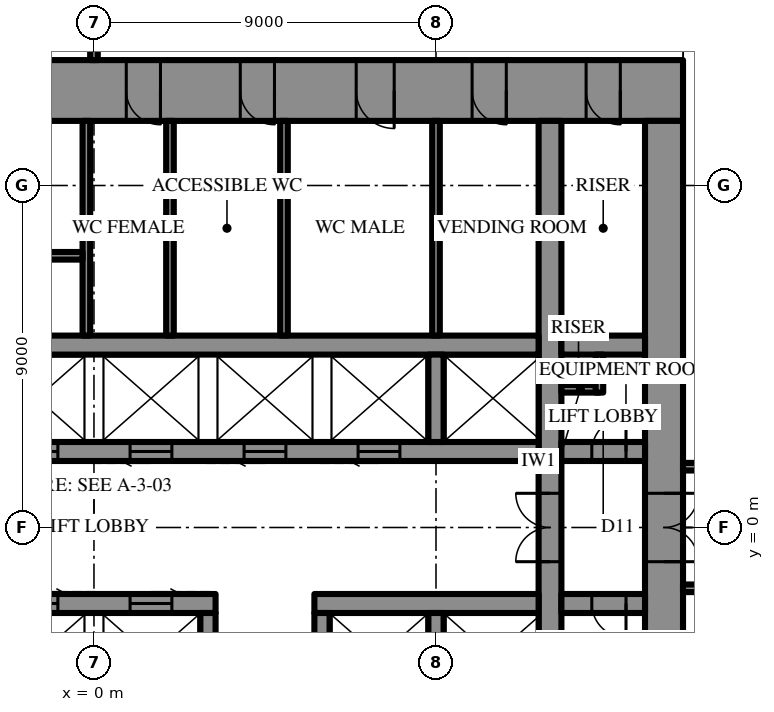
"""IFC4 building model, lengths in metres.
Left out: names, types, materials, properties, quantities, classifications, styles, units other than length and angle.
Written with IfcOpenShell. Run it as: python <this file> out.ifc"""

import sys

from ifc_helpers import new_model, si_unit, direction, frame, frame_2d, origin, place, context, subcontext, project, spatial, rectangle, extrude, element, fill, save


model = new_model("IFC4")
c1 = context("Model", 3, precision=1e-05, world=origin(), true_north=direction((0.0, 1.0)))
c2 = subcontext(c1, "Body", "Model", "MODEL_VIEW")
j1 = project(units=[si_unit("LENGTHUNIT", "METRE"), si_unit("PLANEANGLEUNIT", "RADIAN")], contexts=[c1])
p1 = place(None, origin())
s1 = spatial("IfcSite", under=j1, at=p1, CompositionType="ELEMENT")
p2 = place(p1, origin())
s2 = spatial("IfcBuilding", under=s1, at=p2, CompositionType="ELEMENT")
p3 = place(p2, frame((0.0, 0.0, 265.9)))
s3 = spatial("IfcBuildingStorey", under=s2, at=p3, CompositionType="ELEMENT", Elevation=265.9)
p4 = place(p3, frame((-15.5, 11.5, 0.0), z_axis=(0.0, 0.0, 1.0), x_axis=(1.0, 0.0, 0.0)))
e1 = element("IfcWall", 1, at=p4, inside=s3, PredefinedType="SHEAR", context=c2, shape_type="SweptSolid", body=[
    extrude(rectangle(XDim=31.0, YDim=1.6, at=frame_2d((15.5, 0.0))), origin(), (0.0, 0.0, 1.0), 4.2),
])
p5 = place(p4, frame((16.35, 0.0, 0.0)))
e2 = element("IfcOpeningElement", 2, at=p5, cuts=e1, PredefinedType="OPENING", context=c2, shape_type="SweptSolid", body=[
    extrude(rectangle(XDim=0.9, YDim=2.2, at=frame_2d((0.45, 1.1))), frame((0.0, 0.81, 0.0), z_axis=(0.0, -1.0, 0.0), x_axis=(1.0, 0.0, 0.0)), (0.0, 0.0, 1.0), 1.62),
])
p6 = place(p4, frame((19.35, 0.0, 0.0)))
e3 = element("IfcOpeningElement", 3, at=p6, cuts=e1, PredefinedType="OPENING", context=c2, shape_type="SweptSolid", body=[
    extrude(rectangle(XDim=0.9, YDim=2.2, at=frame_2d((0.45, 1.1))), frame((0.0, 0.81, 0.0), z_axis=(0.0, -1.0, 0.0), x_axis=(1.0, 0.0, 0.0)), (0.0, 0.0, 1.0), 1.62),
])
p7 = place(p4, frame((22.4, 0.0, 0.0)))
e4 = element("IfcOpeningElement", 4, at=p7, cuts=e1, PredefinedType="OPENING", context=c2, shape_type="SweptSolid", body=[
    extrude(rectangle(XDim=1.0, YDim=2.2, at=frame_2d((0.5, 1.1))), frame((0.0, 0.81, 0.0), z_axis=(0.0, -1.0, 0.0), x_axis=(1.0, 0.0, 0.0)), (0.0, 0.0, 1.0), 1.62),
])
p8 = place(p4, frame((1.65, 0.0, 0.0)))
e5 = element("IfcOpeningElement", 5, at=p8, cuts=e1, PredefinedType="OPENING", context=c2, shape_type="SweptSolid", body=[
    extrude(rectangle(XDim=0.9, YDim=2.2, at=frame_2d((0.45, 1.1))), frame((0.0, 0.81, 0.0), z_axis=(0.0, -1.0, 0.0), x_axis=(1.0, 0.0, 0.0)), (0.0, 0.0, 1.0), 1.62),
])
p9 = place(p4, frame((4.65, 0.0, 0.0)))
e6 = element("IfcOpeningElement", 6, at=p9, cuts=e1, PredefinedType="OPENING", context=c2, shape_type="SweptSolid", body=[
    extrude(rectangle(XDim=0.9, YDim=2.2, at=frame_2d((0.45, 1.1))), frame((0.0, 0.81, 0.0), z_axis=(0.0, -1.0, 0.0), x_axis=(1.0, 0.0, 0.0)), (0.0, 0.0, 1.0), 1.62),
])
p10 = place(p4, frame((25.45, 0.0, 0.0)))
e7 = element("IfcOpeningElement", 7, at=p10, cuts=e1, PredefinedType="OPENING", context=c2, shape_type="SweptSolid", body=[
    extrude(rectangle(XDim=0.9, YDim=2.2, at=frame_2d((0.45, 1.1))), frame((0.0, 0.81, 0.0), z_axis=(0.0, -1.0, 0.0), x_axis=(1.0, 0.0, 0.0)), (0.0, 0.0, 1.0), 1.62),
])
p11 = place(p4, frame((28.45, 0.0, 0.0)))
e8 = element("IfcOpeningElement", 8, at=p11, cuts=e1, PredefinedType="OPENING", context=c2, shape_type="SweptSolid", body=[
    extrude(rectangle(XDim=0.9, YDim=2.2, at=frame_2d((0.45, 1.1))), frame((0.0, 0.81, 0.0), z_axis=(0.0, -1.0, 0.0), x_axis=(1.0, 0.0, 0.0)), (0.0, 0.0, 1.0), 1.62),
])
p12 = place(p3, frame((15.0, -10.7, 0.0), z_axis=(0.0, 0.0, 1.0), x_axis=(0.0, 1.0, 0.0)))
e9 = element("IfcWall", 9, at=p12, inside=s3, PredefinedType="SHEAR", context=c2, shape_type="SweptSolid", body=[
    extrude(rectangle(XDim=21.4, YDim=1.0, at=frame_2d((10.7, 0.0))), origin(), (0.0, 0.0, 1.0), 4.2),
])
p13 = place(p12, frame((9.8, 0.0, 0.0)))
e10 = element("IfcOpeningElement", 10, at=p13, cuts=e9, PredefinedType="OPENING", context=c2, shape_type="SweptSolid", body=[
    extrude(rectangle(XDim=1.8, YDim=2.4, at=frame_2d((0.9, 1.2))), frame((0.0, 0.51, 0.0), z_axis=(0.0, -1.0, 0.0), x_axis=(1.0, 0.0, 0.0)), (0.0, 0.0, 1.0), 1.02),
])
p14 = place(p3, frame((12.0, -10.7, 0.0), z_axis=(0.0, 0.0, 1.0), x_axis=(0.0, 1.0, 0.0)))
e11 = element("IfcWall", 11, at=p14, inside=s3, PredefinedType="SHEAR", context=c2, shape_type="SweptSolid", body=[
    extrude(rectangle(XDim=21.4, YDim=0.6, at=frame_2d((10.7, 0.0))), origin(), (0.0, 0.0, 1.0), 4.2),
])
p15 = place(p14, frame((9.8, 0.0, 0.0)))
e12 = element("IfcOpeningElement", 12, at=p15, cuts=e11, PredefinedType="OPENING", context=c2, shape_type="SweptSolid", body=[
    extrude(rectangle(XDim=1.8, YDim=2.4, at=frame_2d((0.9, 1.2))), frame((0.0, 0.31, 0.0), z_axis=(0.0, -1.0, 0.0), x_axis=(1.0, 0.0, 0.0)), (0.0, 0.0, 1.0), 0.62),
])
p16 = place(p3, frame((-3.2, 2.0, 0.0), z_axis=(0.0, 0.0, 1.0), x_axis=(1.0, 0.0, 0.0)))
e13 = element("IfcWall", 13, at=p16, inside=s3, PredefinedType="SHEAR", context=c2, shape_type="SweptSolid", body=[
    extrude(rectangle(XDim=14.9, YDim=0.5, at=frame_2d((7.45, 0.0))), origin(), (0.0, 0.0, 1.0), 4.2),
])
p17 = place(p16, frame((1.15, 0.0, 0.0)))
e14 = element("IfcOpeningElement", 14, at=p17, cuts=e13, PredefinedType="OPENING", context=c2, shape_type="SweptSolid", body=[
    extrude(rectangle(XDim=1.1, YDim=2.2, at=frame_2d((0.55, 1.1))), frame((0.0, 0.26, 0.0), z_axis=(0.0, -1.0, 0.0), x_axis=(1.0, 0.0, 0.0)), (0.0, 0.0, 1.0), 0.52),
])
p18 = place(p16, frame((4.15, 0.0, 0.0)))
e15 = element("IfcOpeningElement", 15, at=p18, cuts=e13, PredefinedType="OPENING", context=c2, shape_type="SweptSolid", body=[
    extrude(rectangle(XDim=1.1, YDim=2.2, at=frame_2d((0.55, 1.1))), frame((0.0, 0.26, 0.0), z_axis=(0.0, -1.0, 0.0), x_axis=(1.0, 0.0, 0.0)), (0.0, 0.0, 1.0), 0.52),
])
p19 = place(p16, frame((7.15, 0.0, 0.0)))
e16 = element("IfcOpeningElement", 16, at=p19, cuts=e13, PredefinedType="OPENING", context=c2, shape_type="SweptSolid", body=[
    extrude(rectangle(XDim=1.1, YDim=2.2, at=frame_2d((0.55, 1.1))), frame((0.0, 0.26, 0.0), z_axis=(0.0, -1.0, 0.0), x_axis=(1.0, 0.0, 0.0)), (0.0, 0.0, 1.0), 0.52),
])
p20 = place(p16, frame((10.15, 0.0, 0.0)))
e17 = element("IfcOpeningElement", 17, at=p20, cuts=e13, PredefinedType="OPENING", context=c2, shape_type="SweptSolid", body=[
    extrude(rectangle(XDim=1.1, YDim=2.2, at=frame_2d((0.55, 1.1))), frame((0.0, 0.26, 0.0), z_axis=(0.0, -1.0, 0.0), x_axis=(1.0, 0.0, 0.0)), (0.0, 0.0, 1.0), 0.52),
])
p21 = place(p3, frame((12.3, 2.0, 0.0), z_axis=(0.0, 0.0, 1.0), x_axis=(1.0, 0.0, 0.0)))
e18 = element("IfcWall", 18, at=p21, inside=s3, PredefinedType="SHEAR", context=c2, shape_type="SweptSolid", body=[
    extrude(rectangle(XDim=2.2, YDim=0.5, at=frame_2d((1.1, 0.0))), origin(), (0.0, 0.0, 1.0), 4.2),
])
p22 = place(p21, frame((0.8, 0.0, 0.0)))
e19 = element("IfcOpeningElement", 19, at=p22, cuts=e18, PredefinedType="OPENING", context=c2, shape_type="SweptSolid", body=[
    extrude(rectangle(XDim=0.9, YDim=2.2, at=frame_2d((0.45, 1.1))), frame((0.0, 0.26, 0.0), z_axis=(0.0, -1.0, 0.0), x_axis=(1.0, 0.0, 0.0)), (0.0, 0.0, 1.0), 0.52),
])
p23 = place(p3, frame((-11.7, 4.8, 0.0), z_axis=(0.0, 0.0, 1.0), x_axis=(1.0, 0.0, 0.0)))
e20 = element("IfcWall", 20, at=p23, inside=s3, PredefinedType="SHEAR", context=c2, shape_type="SweptSolid", body=[
    extrude(rectangle(XDim=23.4, YDim=0.5, at=frame_2d((11.7, 0.0))), origin(), (0.0, 0.0, 1.0), 4.2),
])
p24 = place(p23, frame((6.6, 0.0, 0.0)))
e21 = element("IfcOpeningElement", 21, at=p24, cuts=e20, PredefinedType="OPENING", context=c2, shape_type="SweptSolid", body=[
    extrude(rectangle(XDim=1.2, YDim=2.2, at=frame_2d((0.6, 1.1))), frame((0.0, 0.26, 0.0), z_axis=(0.0, -1.0, 0.0), x_axis=(1.0, 0.0, 0.0)), (0.0, 0.0, 1.0), 0.52),
])
p25 = place(p23, frame((3.6, 0.0, 0.0)))
e22 = element("IfcOpeningElement", 22, at=p25, cuts=e20, PredefinedType="OPENING", context=c2, shape_type="SweptSolid", body=[
    extrude(rectangle(XDim=1.2, YDim=2.2, at=frame_2d((0.6, 1.1))), frame((0.0, 0.26, 0.0), z_axis=(0.0, -1.0, 0.0), x_axis=(1.0, 0.0, 0.0)), (0.0, 0.0, 1.0), 0.52),
])
p26 = place(p3, frame((12.3, 4.8, 0.0), z_axis=(0.0, 0.0, 1.0), x_axis=(1.0, 0.0, 0.0)))
e23 = element("IfcWall", 23, at=p26, inside=s3, PredefinedType="SHEAR", context=c2, shape_type="SweptSolid", body=[
    extrude(rectangle(XDim=2.2, YDim=0.5, at=frame_2d((1.1, 0.0))), origin(), (0.0, 0.0, 1.0), 4.2),
])
p27 = place(p3, frame((9.0, 2.25, 0.0), z_axis=(0.0, 0.0, 1.0), x_axis=(0.0, 1.0, 0.0)))
e24 = element("IfcWall", 24, at=p27, inside=s3, PredefinedType="SHEAR", context=c2, shape_type="SweptSolid", body=[
    extrude(rectangle(XDim=2.3, YDim=0.4, at=frame_2d((1.15, 0.0))), origin(), (0.0, 0.0, 1.0), 4.2),
])
p28 = place(p3, frame((-0.2, 5.05, 0.0), z_axis=(0.0, 0.0, 1.0), x_axis=(0.0, 1.0, 0.0)))
e25 = element("IfcWall", 25, at=p28, inside=s3, PredefinedType="SHEAR", context=c2, shape_type="SweptSolid", body=[
    extrude(rectangle(XDim=5.65, YDim=0.2, at=frame_2d((2.825, 0.0))), origin(), (0.0, 0.0, 1.0), 4.2),
])
p29 = place(p3, frame((-8.9, 7.15, 0.0), z_axis=(0.0, 0.0, 1.0), x_axis=(1.0, 0.0, 0.0)))
e26 = element("IfcWall", 26, at=p29, inside=s3, PredefinedType="SHEAR", context=c2, shape_type="SweptSolid", body=[
    extrude(rectangle(XDim=8.6, YDim=0.2, at=frame_2d((4.3, 0.0))), origin(), (0.0, 0.0, 1.0), 4.2),
])
p30 = place(p29, frame((0.3, 0.0, 0.0)))
e27 = element("IfcOpeningElement", 27, at=p30, cuts=e26, PredefinedType="OPENING", context=c2, shape_type="SweptSolid", body=[
    extrude(rectangle(XDim=1.0, YDim=2.2, at=frame_2d((0.5, 1.1))), frame((0.0, 0.11, 0.0), z_axis=(0.0, -1.0, 0.0), x_axis=(1.0, 0.0, 0.0)), (0.0, 0.0, 1.0), 0.22),
])
p31 = place(p3, frame((14.5, -2.0, 0.0), z_axis=(0.0, 0.0, 1.0), x_axis=(-1.0, 0.0, 0.0)))
e28 = element("IfcWall", 28, at=p31, inside=s3, PredefinedType="SHEAR", context=c2, shape_type="SweptSolid", body=[
    extrude(rectangle(XDim=2.2, YDim=0.5, at=frame_2d((1.1, 0.0))), origin(), (0.0, 0.0, 1.0), 4.2),
])
p32 = place(p31, frame((0.5, 0.0, 0.0)))
e29 = element("IfcOpeningElement", 29, at=p32, cuts=e28, PredefinedType="OPENING", context=c2, shape_type="SweptSolid", body=[
    extrude(rectangle(XDim=0.9, YDim=2.2, at=frame_2d((0.45, 1.1))), frame((0.0, 0.26, 0.0), z_axis=(0.0, -1.0, 0.0), x_axis=(1.0, 0.0, 0.0)), (0.0, 0.0, 1.0), 0.52),
])
p33 = place(p3, frame((11.7, -2.0, 0.0), z_axis=(0.0, 0.0, 1.0), x_axis=(-1.0, 0.0, 0.0)))
e30 = element("IfcWall", 30, at=p33, inside=s3, PredefinedType="SHEAR", context=c2, shape_type="SweptSolid", body=[
    extrude(rectangle(XDim=5.9, YDim=0.5, at=frame_2d((2.95, 0.0))), origin(), (0.0, 0.0, 1.0), 4.2),
])
p34 = place(p3, frame((3.2, -2.0, 0.0), z_axis=(0.0, 0.0, 1.0), x_axis=(-1.0, 0.0, 0.0)))
e31 = element("IfcWall", 31, at=p34, inside=s3, PredefinedType="SHEAR", context=c2, shape_type="SweptSolid", body=[
    extrude(rectangle(XDim=14.9, YDim=0.5, at=frame_2d((7.45, 0.0))), origin(), (0.0, 0.0, 1.0), 4.2),
])
p35 = place(p34, frame((1.15, 0.0, 0.0)))
e32 = element("IfcOpeningElement", 32, at=p35, cuts=e31, PredefinedType="OPENING", context=c2, shape_type="SweptSolid", body=[
    extrude(rectangle(XDim=1.1, YDim=2.2, at=frame_2d((0.55, 1.1))), frame((0.0, 0.26, 0.0), z_axis=(0.0, -1.0, 0.0), x_axis=(1.0, 0.0, 0.0)), (0.0, 0.0, 1.0), 0.52),
])
p36 = place(p34, frame((4.15, 0.0, 0.0)))
e33 = element("IfcOpeningElement", 33, at=p36, cuts=e31, PredefinedType="OPENING", context=c2, shape_type="SweptSolid", body=[
    extrude(rectangle(XDim=1.1, YDim=2.2, at=frame_2d((0.55, 1.1))), frame((0.0, 0.26, 0.0), z_axis=(0.0, -1.0, 0.0), x_axis=(1.0, 0.0, 0.0)), (0.0, 0.0, 1.0), 0.52),
])
p37 = place(p34, frame((7.15, 0.0, 0.0)))
e34 = element("IfcOpeningElement", 34, at=p37, cuts=e31, PredefinedType="OPENING", context=c2, shape_type="SweptSolid", body=[
    extrude(rectangle(XDim=1.1, YDim=2.2, at=frame_2d((0.55, 1.1))), frame((0.0, 0.26, 0.0), z_axis=(0.0, -1.0, 0.0), x_axis=(1.0, 0.0, 0.0)), (0.0, 0.0, 1.0), 0.52),
])
p38 = place(p34, frame((10.15, 0.0, 0.0)))
e35 = element("IfcOpeningElement", 35, at=p38, cuts=e31, PredefinedType="OPENING", context=c2, shape_type="SweptSolid", body=[
    extrude(rectangle(XDim=1.1, YDim=2.2, at=frame_2d((0.55, 1.1))), frame((0.0, 0.26, 0.0), z_axis=(0.0, -1.0, 0.0), x_axis=(1.0, 0.0, 0.0)), (0.0, 0.0, 1.0), 0.52),
])
for number, where, z_axis, x_axis in (
    (36, (9.0, -2.25, 0.0), (0.0, 0.0, 1.0), (0.0, -1.0, 0.0)),
    (37, (6.0, -2.25, 0.0), (0.0, 0.0, 1.0), (0.0, -1.0, 0.0)),
    (38, (3.0, -2.25, 0.0), (0.0, 0.0, 1.0), (0.0, -1.0, 0.0)),
):
    element("IfcWall", number, at=place(p3, frame(where, z_axis=z_axis, x_axis=x_axis)), inside=s3, PredefinedType="SHEAR", context=c2, shape_type="SweptSolid", body=[
        extrude(rectangle(XDim=2.3, YDim=0.4, at=frame_2d((1.15, 0.0))), origin(), (0.0, 0.0, 1.0), 4.2),
    ])
for number, where, z_axis, x_axis in (
    (39, (9.0, 5.05, 0.0), (0.0, 0.0, 1.0), (0.0, 1.0, 0.0)),
    (40, (2.0, 5.05, 0.0), (0.0, 0.0, 1.0), (0.0, 1.0, 0.0)),
    (41, (5.0, 5.05, 0.0), (0.0, 0.0, 1.0), (0.0, 1.0, 0.0)),
):
    element("IfcWall", number, at=place(p3, frame(where, z_axis=z_axis, x_axis=x_axis)), inside=s3, PredefinedType="PARTITIONING", context=c2, shape_type="SweptSolid", body=[
        extrude(rectangle(XDim=5.65, YDim=0.2, at=frame_2d((2.825, 0.0))), origin(), (0.0, 0.0, 1.0), 4.0),
    ])
for number, where, z_axis, x_axis in (
    (42, (12.3, 3.65, 0.0), (0.0, 0.0, 1.0), (1.0, 0.0, 0.0)),
    (43, (13.3, 3.55, 0.0), (0.0, 0.0, 1.0), (0.0, 1.0, 0.0)),
):
    element("IfcWall", number, at=place(p3, frame(where, z_axis=z_axis, x_axis=x_axis)), inside=s3, PredefinedType="PARTITIONING", context=c2, shape_type="SweptSolid", body=[
        extrude(rectangle(XDim=1.0, YDim=0.2, at=frame_2d((0.5, 0.0))), origin(), (0.0, 0.0, 1.0), 4.0),
    ])
p39 = place(p3, frame((15.5, 1.6, 0.0), z_axis=(0.0, 0.0, 1.0), x_axis=(1.0, 0.0, 0.0)))
e44 = element("IfcWall", 44, at=p39, inside=s3, PredefinedType="PARTITIONING", context=c2, shape_type="SweptSolid", body=[
    extrude(rectangle(XDim=2.3, YDim=0.2, at=frame_2d((1.15, 0.0))), origin(), (0.0, 0.0, 1.0), 4.0),
])
p40 = place(p3, frame((15.5, -1.6, 0.0), z_axis=(0.0, 0.0, 1.0), x_axis=(1.0, 0.0, 0.0)))
e45 = element("IfcWall", 45, at=p40, inside=s3, PredefinedType="PARTITIONING", context=c2, shape_type="SweptSolid", body=[
    extrude(rectangle(XDim=9.7, YDim=0.2, at=frame_2d((4.85, 0.0))), origin(), (0.0, 0.0, 1.0), 4.0),
])
p41 = place(p40, frame((6.29, 0.0, 0.0)))
e46 = element("IfcOpeningElement", 46, at=p41, cuts=e45, PredefinedType="OPENING", context=c2, shape_type="SweptSolid", body=[
    extrude(rectangle(XDim=1.0, YDim=2.2, at=frame_2d((0.5, 1.1))), frame((0.0, 0.11, 0.0), z_axis=(0.0, -1.0, 0.0), x_axis=(1.0, 0.0, 0.0)), (0.0, 0.0, 1.0), 0.22),
])
p42 = place(p3, frame((0.0, 12.3, 0.0), z_axis=(0.0, 0.0, 1.0), x_axis=(0.0, 1.0, 0.0)))
e47 = element("IfcWall", 47, at=p42, inside=s3, PredefinedType="PARTITIONING", context=c2, shape_type="SweptSolid", body=[
    extrude(rectangle(XDim=15.55, YDim=0.2, at=frame_2d((7.775, 0.0))), origin(), (0.0, 0.0, 1.0), 2.992),
])
p43 = place(p42, frame((1.055, 0.0, 0.0)))
e48 = element("IfcOpeningElement", 48, at=p43, cuts=e47, PredefinedType="OPENING", context=c2, shape_type="SweptSolid", body=[
    extrude(rectangle(XDim=1.0, YDim=2.2, at=frame_2d((0.5, 1.1))), frame((0.0, 0.11, 0.0), z_axis=(0.0, -1.0, 0.0), x_axis=(1.0, 0.0, 0.0)), (0.0, 0.0, 1.0), 0.22),
])
p44 = place(p13, frame((1.8, 0.0, 0.0), z_axis=(0.0, 0.0, 1.0), x_axis=(-1.0, 0.0, 0.0)))
e49 = element("IfcDoor", 49, at=p44, inside=s3, OperationType="DOUBLE_DOOR_SINGLE_SWING", PredefinedType="DOOR", context=c2, shape_type="SweptSolid", body=[
    extrude(rectangle(XDim=1.8, YDim=2.4, at=frame_2d((0.9, 1.2))), frame((0.0, 0.025, 0.0), z_axis=(0.0, -1.0, 0.0), x_axis=(1.0, 0.0, 0.0)), (0.0, 0.0, 1.0), 0.05),
])
fill(e10, e49)
p45 = place(p5, frame((0.9, 0.0, 0.0), z_axis=(0.0, 0.0, 1.0), x_axis=(-1.0, 0.0, 0.0)))
e50 = element("IfcDoor", 50, at=p45, inside=s3, OperationType="SINGLE_SWING_RIGHT", PredefinedType="DOOR", context=c2, shape_type="SweptSolid", body=[
    extrude(rectangle(XDim=0.9, YDim=2.2, at=frame_2d((0.45, 1.1))), frame((0.0, 0.025, 0.0), z_axis=(0.0, -1.0, 0.0), x_axis=(1.0, 0.0, 0.0)), (0.0, 0.0, 1.0), 0.05),
])
fill(e2, e50)
p46 = place(p6, frame((0.9, 0.0, 0.0), z_axis=(0.0, 0.0, 1.0), x_axis=(-1.0, 0.0, 0.0)))
e51 = element("IfcDoor", 51, at=p46, inside=s3, OperationType="SINGLE_SWING_RIGHT", PredefinedType="DOOR", context=c2, shape_type="SweptSolid", body=[
    extrude(rectangle(XDim=0.9, YDim=2.2, at=frame_2d((0.45, 1.1))), frame((0.0, 0.025, 0.0), z_axis=(0.0, -1.0, 0.0), x_axis=(1.0, 0.0, 0.0)), (0.0, 0.0, 1.0), 0.05),
])
fill(e3, e51)
p47 = place(p7, frame((1.0, 0.0, 0.0), z_axis=(0.0, 0.0, 1.0), x_axis=(-1.0, 0.0, 0.0)))
e52 = element("IfcDoor", 52, at=p47, inside=s3, OperationType="SINGLE_SWING_RIGHT", PredefinedType="DOOR", context=c2, shape_type="SweptSolid", body=[
    extrude(rectangle(XDim=1.0, YDim=2.2, at=frame_2d((0.5, 1.1))), frame((0.0, 0.025, 0.0), z_axis=(0.0, -1.0, 0.0), x_axis=(1.0, 0.0, 0.0)), (0.0, 0.0, 1.0), 0.05),
])
fill(e4, e52)
p48 = place(p10, frame((0.9, 0.0, 0.0), z_axis=(0.0, 0.0, 1.0), x_axis=(-1.0, 0.0, 0.0)))
e53 = element("IfcDoor", 53, at=p48, inside=s3, OperationType="SINGLE_SWING_RIGHT", PredefinedType="DOOR", context=c2, shape_type="SweptSolid", body=[
    extrude(rectangle(XDim=0.9, YDim=2.2, at=frame_2d((0.45, 1.1))), frame((0.0, 0.025, 0.0), z_axis=(0.0, -1.0, 0.0), x_axis=(1.0, 0.0, 0.0)), (0.0, 0.0, 1.0), 0.05),
])
fill(e7, e53)
p49 = place(p11, frame((0.9, 0.0, 0.0), z_axis=(0.0, 0.0, 1.0), x_axis=(-1.0, 0.0, 0.0)))
e54 = element("IfcDoor", 54, at=p49, inside=s3, OperationType="SINGLE_SWING_RIGHT", PredefinedType="DOOR", context=c2, shape_type="SweptSolid", body=[
    extrude(rectangle(XDim=0.9, YDim=2.2, at=frame_2d((0.45, 1.1))), frame((0.0, 0.025, 0.0), z_axis=(0.0, -1.0, 0.0), x_axis=(1.0, 0.0, 0.0)), (0.0, 0.0, 1.0), 0.05),
])
fill(e8, e54)
p50 = place(p22, origin())
e55 = element("IfcDoor", 55, at=p50, inside=s3, OperationType="SINGLE_SWING_LEFT", PredefinedType="DOOR", context=c2, shape_type="SweptSolid", body=[
    extrude(rectangle(XDim=0.9, YDim=2.2, at=frame_2d((0.45, 1.1))), frame((0.0, 0.025, 0.0), z_axis=(0.0, -1.0, 0.0), x_axis=(1.0, 0.0, 0.0)), (0.0, 0.0, 1.0), 0.05),
])
fill(e19, e55)
p51 = place(p32, origin())
e56 = element("IfcDoor", 56, at=p51, inside=s3, OperationType="SINGLE_SWING_RIGHT", PredefinedType="DOOR", context=c2, shape_type="SweptSolid", body=[
    extrude(rectangle(XDim=0.9, YDim=2.2, at=frame_2d((0.45, 1.1))), frame((0.0, 0.025, 0.0), z_axis=(0.0, -1.0, 0.0), x_axis=(1.0, 0.0, 0.0)), (0.0, 0.0, 1.0), 0.05),
])
fill(e29, e56)
p52 = place(p15, origin())
e57 = element("IfcDoor", 57, at=p52, inside=s3, OperationType="DOUBLE_DOOR_SINGLE_SWING", PredefinedType="DOOR", context=c2, shape_type="SweptSolid", body=[
    extrude(rectangle(XDim=1.8, YDim=2.4, at=frame_2d((0.9, 1.2))), frame((0.0, 0.025, 0.0), z_axis=(0.0, -1.0, 0.0), x_axis=(1.0, 0.0, 0.0)), (0.0, 0.0, 1.0), 0.05),
])
fill(e12, e57)
p53 = place(p17, frame((1.1, 0.0, 0.0), z_axis=(0.0, 0.0, 1.0), x_axis=(-1.0, 0.0, 0.0)))
e58 = element("IfcDoor", 58, at=p53, inside=s3, OperationType="SLIDING_TO_LEFT", PredefinedType="DOOR", context=c2, shape_type="SweptSolid", body=[
    extrude(rectangle(XDim=1.1, YDim=2.2, at=frame_2d((0.55, 1.1))), frame((0.0, 0.025, 0.0), z_axis=(0.0, -1.0, 0.0), x_axis=(1.0, 0.0, 0.0)), (0.0, 0.0, 1.0), 0.05),
])
fill(e14, e58)
p54 = place(p18, frame((1.1, 0.0, 0.0), z_axis=(0.0, 0.0, 1.0), x_axis=(-1.0, 0.0, 0.0)))
e59 = element("IfcDoor", 59, at=p54, inside=s3, OperationType="SLIDING_TO_LEFT", PredefinedType="DOOR", context=c2, shape_type="SweptSolid", body=[
    extrude(rectangle(XDim=1.1, YDim=2.2, at=frame_2d((0.55, 1.1))), frame((0.0, 0.025, 0.0), z_axis=(0.0, -1.0, 0.0), x_axis=(1.0, 0.0, 0.0)), (0.0, 0.0, 1.0), 0.05),
])
fill(e15, e59)
p55 = place(p19, frame((1.1, 0.0, 0.0), z_axis=(0.0, 0.0, 1.0), x_axis=(-1.0, 0.0, 0.0)))
e60 = element("IfcDoor", 60, at=p55, inside=s3, OperationType="SLIDING_TO_LEFT", PredefinedType="DOOR", context=c2, shape_type="SweptSolid", body=[
    extrude(rectangle(XDim=1.1, YDim=2.2, at=frame_2d((0.55, 1.1))), frame((0.0, 0.025, 0.0), z_axis=(0.0, -1.0, 0.0), x_axis=(1.0, 0.0, 0.0)), (0.0, 0.0, 1.0), 0.05),
])
fill(e16, e60)
p56 = place(p20, frame((1.1, 0.0, 0.0), z_axis=(0.0, 0.0, 1.0), x_axis=(-1.0, 0.0, 0.0)))
e61 = element("IfcDoor", 61, at=p56, inside=s3, OperationType="SLIDING_TO_LEFT", PredefinedType="DOOR", context=c2, shape_type="SweptSolid", body=[
    extrude(rectangle(XDim=1.1, YDim=2.2, at=frame_2d((0.55, 1.1))), frame((0.0, 0.025, 0.0), z_axis=(0.0, -1.0, 0.0), x_axis=(1.0, 0.0, 0.0)), (0.0, 0.0, 1.0), 0.05),
])
fill(e17, e61)
p57 = place(p35, frame((1.1, 0.0, 0.0), z_axis=(0.0, 0.0, 1.0), x_axis=(-1.0, 0.0, 0.0)))
e62 = element("IfcDoor", 62, at=p57, inside=s3, OperationType="SLIDING_TO_LEFT", PredefinedType="DOOR", context=c2, shape_type="SweptSolid", body=[
    extrude(rectangle(XDim=1.1, YDim=2.2, at=frame_2d((0.55, 1.1))), frame((0.0, 0.025, 0.0), z_axis=(0.0, -1.0, 0.0), x_axis=(1.0, 0.0, 0.0)), (0.0, 0.0, 1.0), 0.05),
])
fill(e32, e62)
p58 = place(p36, frame((1.1, 0.0, 0.0), z_axis=(0.0, 0.0, 1.0), x_axis=(-1.0, 0.0, 0.0)))
e63 = element("IfcDoor", 63, at=p58, inside=s3, OperationType="SLIDING_TO_LEFT", PredefinedType="DOOR", context=c2, shape_type="SweptSolid", body=[
    extrude(rectangle(XDim=1.1, YDim=2.2, at=frame_2d((0.55, 1.1))), frame((0.0, 0.025, 0.0), z_axis=(0.0, -1.0, 0.0), x_axis=(1.0, 0.0, 0.0)), (0.0, 0.0, 1.0), 0.05),
])
fill(e33, e63)
save(model, sys.argv[1])
